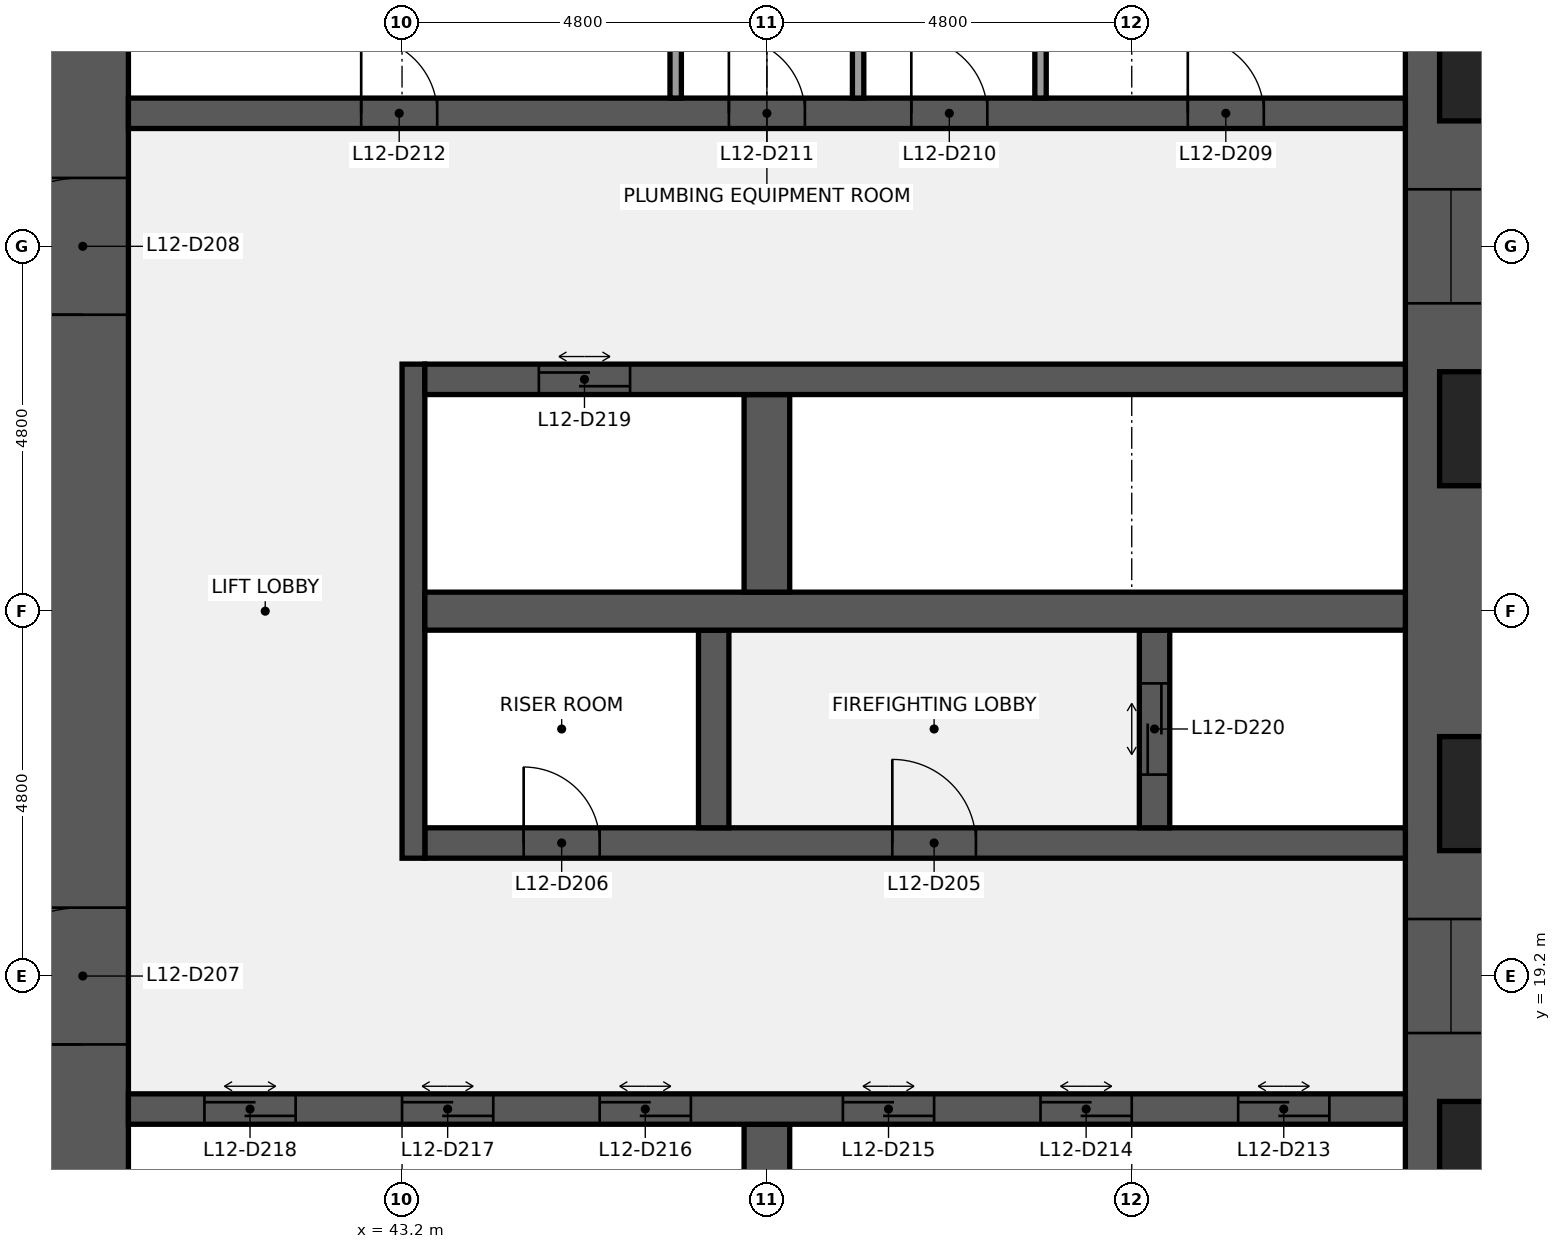
"""IFC4 building model, lengths in metres.
Left out: names, types, materials, properties, quantities, classifications, styles, units other than length and angle.
Written with IfcOpenShell. Run it as: python <this file> out.ifc"""

import sys

from ifc_helpers import new_model, si_unit, direction, frame, frame_2d, origin, place, context, subcontext, project, spatial, rectangle, extrude, element, fill, save


model = new_model("IFC4")
c1 = context("Model", 3, precision=1e-05, world=origin(), true_north=direction((0.0, 1.0)))
c2 = subcontext(c1, "Body", "Model", "MODEL_VIEW")
j1 = project(units=[si_unit("LENGTHUNIT", "METRE"), si_unit("PLANEANGLEUNIT", "RADIAN")], contexts=[c1])
p1 = place(None, origin())
s1 = spatial("IfcSite", under=j1, at=p1, CompositionType="ELEMENT")
p2 = place(p1, origin())
s2 = spatial("IfcBuilding", under=s1, at=p2, CompositionType="ELEMENT")
p3 = place(p2, frame((0.0, 0.0, 59.0)))
s3 = spatial("IfcBuildingStorey", under=s2, at=p3, CompositionType="ELEMENT", Elevation=59.0)
p4 = place(p3, frame((57.0, 38.4, 0.0), z_axis=(0.0, 0.0, 1.0), x_axis=(0.0, -1.0, 0.0)))
e1 = element("IfcWall", 1, at=p4, inside=s3, PredefinedType="SHEAR", context=c2, shape_type="SweptSolid", body=[
    extrude(rectangle(XDim=28.8, YDim=1.2, at=frame_2d((14.4, 0.0))), origin(), (0.0, 0.0, 1.0), 3.84),
])
p5 = place(p4, frame((18.45, 0.0, 0.9)))
e2 = element("IfcOpeningElement", 2, at=p5, cuts=e1, PredefinedType="OPENING", context=c2, shape_type="SweptSolid", body=[
    extrude(rectangle(XDim=1.5, YDim=1.5, at=frame_2d((0.75, 0.75))), frame((0.0, 0.61, 0.0), z_axis=(0.0, -1.0, 0.0), x_axis=(1.0, 0.0, 0.0)), (0.0, 0.0, 1.0), 1.22),
])
p6 = place(p4, frame((8.85, 0.0, 0.9)))
e3 = element("IfcOpeningElement", 3, at=p6, cuts=e1, PredefinedType="OPENING", context=c2, shape_type="SweptSolid", body=[
    extrude(rectangle(XDim=1.5, YDim=1.5, at=frame_2d((0.75, 0.75))), frame((0.0, 0.61, 0.0), z_axis=(0.0, -1.0, 0.0), x_axis=(1.0, 0.0, 0.0)), (0.0, 0.0, 1.0), 1.22),
])
p7 = place(p3, frame((39.0, 9.6, 0.0), z_axis=(0.0, 0.0, 1.0), x_axis=(0.0, 1.0, 0.0)))
e4 = element("IfcWall", 4, at=p7, inside=s3, PredefinedType="SHEAR", context=c2, shape_type="SweptSolid", body=[
    extrude(rectangle(XDim=28.8, YDim=1.2, at=frame_2d((14.4, 0.0))), origin(), (0.0, 0.0, 1.0), 3.84),
])
p8 = place(p7, frame((8.7, 0.0, 0.0)))
e5 = element("IfcOpeningElement", 5, at=p8, cuts=e4, PredefinedType="OPENING", context=c2, shape_type="SweptSolid", body=[
    extrude(rectangle(XDim=1.8, YDim=2.1, at=frame_2d((0.9, 1.05))), frame((0.0, 0.61, 0.0), z_axis=(0.0, -1.0, 0.0), x_axis=(1.0, 0.0, 0.0)), (0.0, 0.0, 1.0), 1.22),
])
p9 = place(p7, frame((18.3, 0.0, 0.0)))
e6 = element("IfcOpeningElement", 6, at=p9, cuts=e4, PredefinedType="OPENING", context=c2, shape_type="SweptSolid", body=[
    extrude(rectangle(XDim=1.8, YDim=2.1, at=frame_2d((0.9, 1.05))), frame((0.0, 0.61, 0.0), z_axis=(0.0, -1.0, 0.0), x_axis=(1.0, 0.0, 0.0)), (0.0, 0.0, 1.0), 1.22),
])
p10 = place(p3, frame((48.0, 14.65, 0.0), z_axis=(0.0, 0.0, 1.0), x_axis=(0.0, 1.0, 0.0)))
e7 = element("IfcWall", 7, at=p10, inside=s3, PredefinedType="SHEAR", context=c2, shape_type="SweptSolid", body=[
    extrude(rectangle(XDim=2.6, YDim=0.6, at=frame_2d((1.3, 0.0))), origin(), (0.0, 0.0, 1.0), 3.84),
])
p11 = place(p3, frame((39.6, 17.45, 0.0), z_axis=(0.0, 0.0, 1.0), x_axis=(1.0, 0.0, 0.0)))
e8 = element("IfcWall", 8, at=p11, inside=s3, PredefinedType="SHEAR", context=c2, shape_type="SweptSolid", body=[
    extrude(rectangle(XDim=16.8, YDim=0.4, at=frame_2d((8.4, 0.0))), origin(), (0.0, 0.0, 1.0), 3.84),
])
p12 = place(p11, frame((14.6, 0.0, 0.0)))
e9 = element("IfcOpeningElement", 9, at=p12, cuts=e8, PredefinedType="OPENING", context=c2, shape_type="SweptSolid", body=[
    extrude(rectangle(XDim=1.2, YDim=2.1, at=frame_2d((0.6, 1.05))), frame((0.0, 0.21, 0.0), z_axis=(0.0, -1.0, 0.0), x_axis=(1.0, 0.0, 0.0)), (0.0, 0.0, 1.0), 0.42),
])
p13 = place(p11, frame((12.0, 0.0, 0.0)))
e10 = element("IfcOpeningElement", 10, at=p13, cuts=e8, PredefinedType="OPENING", context=c2, shape_type="SweptSolid", body=[
    extrude(rectangle(XDim=1.2, YDim=2.1, at=frame_2d((0.6, 1.05))), frame((0.0, 0.21, 0.0), z_axis=(0.0, -1.0, 0.0), x_axis=(1.0, 0.0, 0.0)), (0.0, 0.0, 1.0), 0.42),
])
p14 = place(p11, frame((9.4, 0.0, 0.0)))
e11 = element("IfcOpeningElement", 11, at=p14, cuts=e8, PredefinedType="OPENING", context=c2, shape_type="SweptSolid", body=[
    extrude(rectangle(XDim=1.2, YDim=2.1, at=frame_2d((0.6, 1.05))), frame((0.0, 0.21, 0.0), z_axis=(0.0, -1.0, 0.0), x_axis=(1.0, 0.0, 0.0)), (0.0, 0.0, 1.0), 0.42),
])
p15 = place(p11, frame((6.2, 0.0, 0.0)))
e12 = element("IfcOpeningElement", 12, at=p15, cuts=e8, PredefinedType="OPENING", context=c2, shape_type="SweptSolid", body=[
    extrude(rectangle(XDim=1.2, YDim=2.1, at=frame_2d((0.6, 1.05))), frame((0.0, 0.21, 0.0), z_axis=(0.0, -1.0, 0.0), x_axis=(1.0, 0.0, 0.0)), (0.0, 0.0, 1.0), 0.42),
])
p16 = place(p11, frame((3.6, 0.0, 0.0)))
e13 = element("IfcOpeningElement", 13, at=p16, cuts=e8, PredefinedType="OPENING", context=c2, shape_type="SweptSolid", body=[
    extrude(rectangle(XDim=1.2, YDim=2.1, at=frame_2d((0.6, 1.05))), frame((0.0, 0.21, 0.0), z_axis=(0.0, -1.0, 0.0), x_axis=(1.0, 0.0, 0.0)), (0.0, 0.0, 1.0), 0.42),
])
p17 = place(p11, frame((1.0, 0.0, 0.0)))
e14 = element("IfcOpeningElement", 14, at=p17, cuts=e8, PredefinedType="OPENING", context=c2, shape_type="SweptSolid", body=[
    extrude(rectangle(XDim=1.2, YDim=2.1, at=frame_2d((0.6, 1.05))), frame((0.0, 0.21, 0.0), z_axis=(0.0, -1.0, 0.0), x_axis=(1.0, 0.0, 0.0)), (0.0, 0.0, 1.0), 0.42),
])
p18 = place(p3, frame((43.5, 20.95, 0.0), z_axis=(0.0, 0.0, 1.0), x_axis=(1.0, 0.0, 0.0)))
e15 = element("IfcWall", 15, at=p18, inside=s3, PredefinedType="SHEAR", context=c2, shape_type="SweptSolid", body=[
    extrude(rectangle(XDim=12.9, YDim=0.4, at=frame_2d((6.45, 0.0))), origin(), (0.0, 0.0, 1.0), 3.84),
])
p19 = place(p18, frame((6.15, 0.0, 0.0)))
e16 = element("IfcOpeningElement", 16, at=p19, cuts=e15, PredefinedType="OPENING", context=c2, shape_type="SweptSolid", body=[
    extrude(rectangle(XDim=1.1, YDim=2.1, at=frame_2d((0.55, 1.05))), frame((0.0, 0.21, 0.0), z_axis=(0.0, -1.0, 0.0), x_axis=(1.0, 0.0, 0.0)), (0.0, 0.0, 1.0), 0.42),
])
p20 = place(p18, frame((1.3, 0.0, 0.0)))
e17 = element("IfcOpeningElement", 17, at=p20, cuts=e15, PredefinedType="OPENING", context=c2, shape_type="SweptSolid", body=[
    extrude(rectangle(XDim=1.0, YDim=2.1, at=frame_2d((0.5, 1.05))), frame((0.0, 0.21, 0.0), z_axis=(0.0, -1.0, 0.0), x_axis=(1.0, 0.0, 0.0)), (0.0, 0.0, 1.0), 0.42),
])
p21 = place(p3, frame((43.35, 20.75, 0.0), z_axis=(0.0, 0.0, 1.0), x_axis=(0.0, 1.0, 0.0)))
e18 = element("IfcWall", 18, at=p21, inside=s3, PredefinedType="SHEAR", context=c2, shape_type="SweptSolid", body=[
    extrude(rectangle(XDim=6.5, YDim=0.3, at=frame_2d((3.25, 0.0))), origin(), (0.0, 0.0, 1.0), 3.84),
])
p22 = place(p3, frame((53.1, 21.15, 0.0), z_axis=(0.0, 0.0, 1.0), x_axis=(0.0, 1.0, 0.0)))
e19 = element("IfcWall", 19, at=p22, inside=s3, PredefinedType="SHEAR", context=c2, shape_type="SweptSolid", body=[
    extrude(rectangle(XDim=2.6, YDim=0.4, at=frame_2d((1.3, 0.0))), origin(), (0.0, 0.0, 1.0), 3.84),
])
p23 = place(p22, frame((0.7, 0.0, 0.0)))
e20 = element("IfcOpeningElement", 20, at=p23, cuts=e19, PredefinedType="OPENING", context=c2, shape_type="SweptSolid", body=[
    extrude(rectangle(XDim=1.2, YDim=2.1, at=frame_2d((0.6, 1.05))), frame((0.0, 0.21, 0.0), z_axis=(0.0, -1.0, 0.0), x_axis=(1.0, 0.0, 0.0)), (0.0, 0.0, 1.0), 0.42),
])
p24 = place(p3, frame((47.3, 21.15, 0.0), z_axis=(0.0, 0.0, 1.0), x_axis=(0.0, 1.0, 0.0)))
e21 = element("IfcWall", 21, at=p24, inside=s3, PredefinedType="SHEAR", context=c2, shape_type="SweptSolid", body=[
    extrude(rectangle(XDim=2.6, YDim=0.4, at=frame_2d((1.3, 0.0))), origin(), (0.0, 0.0, 1.0), 3.84),
])
p25 = place(p3, frame((43.5, 24.0, 0.0), z_axis=(0.0, 0.0, 1.0), x_axis=(1.0, 0.0, 0.0)))
e22 = element("IfcWall", 22, at=p25, inside=s3, PredefinedType="SHEAR", context=c2, shape_type="SweptSolid", body=[
    extrude(rectangle(XDim=12.9, YDim=0.5, at=frame_2d((6.45, 0.0))), origin(), (0.0, 0.0, 1.0), 3.84),
])
p26 = place(p3, frame((48.0, 24.25, 0.0), z_axis=(0.0, 0.0, 1.0), x_axis=(0.0, 1.0, 0.0)))
e23 = element("IfcWall", 23, at=p26, inside=s3, PredefinedType="SHEAR", context=c2, shape_type="SweptSolid", body=[
    extrude(rectangle(XDim=2.6, YDim=0.6, at=frame_2d((1.3, 0.0))), origin(), (0.0, 0.0, 1.0), 3.84),
])
p27 = place(p3, frame((43.5, 27.05, 0.0), z_axis=(0.0, 0.0, 1.0), x_axis=(1.0, 0.0, 0.0)))
e24 = element("IfcWall", 24, at=p27, inside=s3, PredefinedType="SHEAR", context=c2, shape_type="SweptSolid", body=[
    extrude(rectangle(XDim=12.9, YDim=0.4, at=frame_2d((6.45, 0.0))), origin(), (0.0, 0.0, 1.0), 3.84),
])
p28 = place(p27, frame((1.5, 0.0, 0.0)))
e25 = element("IfcOpeningElement", 25, at=p28, cuts=e24, PredefinedType="OPENING", context=c2, shape_type="SweptSolid", body=[
    extrude(rectangle(XDim=1.2, YDim=2.1, at=frame_2d((0.6, 1.05))), frame((0.0, 0.21, 0.0), z_axis=(0.0, -1.0, 0.0), x_axis=(1.0, 0.0, 0.0)), (0.0, 0.0, 1.0), 0.42),
])
p29 = place(p3, frame((39.6, 30.55, 0.0), z_axis=(0.0, 0.0, 1.0), x_axis=(1.0, 0.0, 0.0)))
e26 = element("IfcWall", 26, at=p29, inside=s3, PredefinedType="SHEAR", context=c2, shape_type="SweptSolid", body=[
    extrude(rectangle(XDim=16.8, YDim=0.4, at=frame_2d((8.4, 0.0))), origin(), (0.0, 0.0, 1.0), 3.84),
])
p30 = place(p29, frame((13.938, 0.0, 0.0)))
e27 = element("IfcOpeningElement", 27, at=p30, cuts=e26, PredefinedType="OPENING", context=c2, shape_type="SweptSolid", body=[
    extrude(rectangle(XDim=1.0, YDim=2.1, at=frame_2d((0.5, 1.05))), frame((0.0, 0.21, 0.0), z_axis=(0.0, -1.0, 0.0), x_axis=(1.0, 0.0, 0.0)), (0.0, 0.0, 1.0), 0.42),
])
p31 = place(p29, frame((10.3, 0.0, 0.0)))
e28 = element("IfcOpeningElement", 28, at=p31, cuts=e26, PredefinedType="OPENING", context=c2, shape_type="SweptSolid", body=[
    extrude(rectangle(XDim=1.0, YDim=2.1, at=frame_2d((0.5, 1.05))), frame((0.0, 0.21, 0.0), z_axis=(0.0, -1.0, 0.0), x_axis=(1.0, 0.0, 0.0)), (0.0, 0.0, 1.0), 0.42),
])
p32 = place(p29, frame((7.9, 0.0, 0.0)))
e29 = element("IfcOpeningElement", 29, at=p32, cuts=e26, PredefinedType="OPENING", context=c2, shape_type="SweptSolid", body=[
    extrude(rectangle(XDim=1.0, YDim=2.1, at=frame_2d((0.5, 1.05))), frame((0.0, 0.21, 0.0), z_axis=(0.0, -1.0, 0.0), x_axis=(1.0, 0.0, 0.0)), (0.0, 0.0, 1.0), 0.42),
])
p33 = place(p29, frame((3.062, 0.0, 0.0)))
e30 = element("IfcOpeningElement", 30, at=p33, cuts=e26, PredefinedType="OPENING", context=c2, shape_type="SweptSolid", body=[
    extrude(rectangle(XDim=1.0, YDim=2.1, at=frame_2d((0.5, 1.05))), frame((0.0, 0.21, 0.0), z_axis=(0.0, -1.0, 0.0), x_axis=(1.0, 0.0, 0.0)), (0.0, 0.0, 1.0), 0.42),
])
for number, where, z_axis, x_axis in (
    (31, (51.6, 30.75, 0.0), (0.0, 0.0, 1.0), (0.0, 1.0, 0.0)),
    (32, (49.2, 30.75, 0.0), (0.0, 0.0, 1.0), (0.0, 1.0, 0.0)),
    (33, (46.8, 30.75, 0.0), (0.0, 0.0, 1.0), (0.0, 1.0, 0.0)),
):
    element("IfcWall", number, at=place(p3, frame(where, z_axis=z_axis, x_axis=x_axis)), inside=s3, PredefinedType="PARTITIONING", context=c2, shape_type="SweptSolid", body=[
        extrude(rectangle(XDim=2.6, YDim=0.15, at=frame_2d((1.3, 0.0))), origin(), (0.0, 0.0, 1.0), 3.84),
    ])
p34 = place(p19, origin())
e34 = element("IfcDoor", 34, at=p34, inside=s3, OperationType="SINGLE_SWING_LEFT", PredefinedType="DOOR", context=c2, shape_type="SweptSolid", body=[
    extrude(rectangle(XDim=1.1, YDim=2.1, at=frame_2d((0.55, 1.05))), frame((0.0, 0.025, 0.0), z_axis=(0.0, -1.0, 0.0), x_axis=(1.0, 0.0, 0.0)), (0.0, 0.0, 1.0), 0.05),
])
fill(e16, e34)
p35 = place(p20, origin())
e35 = element("IfcDoor", 35, at=p35, inside=s3, OperationType="SINGLE_SWING_LEFT", PredefinedType="DOOR", context=c2, shape_type="SweptSolid", body=[
    extrude(rectangle(XDim=1.0, YDim=2.1, at=frame_2d((0.5, 1.05))), frame((0.0, 0.025, 0.0), z_axis=(0.0, -1.0, 0.0), x_axis=(1.0, 0.0, 0.0)), (0.0, 0.0, 1.0), 0.05),
])
fill(e17, e35)
p36 = place(p8, origin())
e36 = element("IfcDoor", 36, at=p36, inside=s3, OperationType="DOUBLE_DOOR_SINGLE_SWING", PredefinedType="DOOR", context=c2, shape_type="SweptSolid", body=[
    extrude(rectangle(XDim=1.8, YDim=2.1, at=frame_2d((0.9, 1.05))), frame((0.0, 0.025, 0.0), z_axis=(0.0, -1.0, 0.0), x_axis=(1.0, 0.0, 0.0)), (0.0, 0.0, 1.0), 0.05),
])
fill(e5, e36)
p37 = place(p9, origin())
e37 = element("IfcDoor", 37, at=p37, inside=s3, OperationType="DOUBLE_DOOR_SINGLE_SWING", PredefinedType="DOOR", context=c2, shape_type="SweptSolid", body=[
    extrude(rectangle(XDim=1.8, YDim=2.1, at=frame_2d((0.9, 1.05))), frame((0.0, 0.025, 0.0), z_axis=(0.0, -1.0, 0.0), x_axis=(1.0, 0.0, 0.0)), (0.0, 0.0, 1.0), 0.05),
])
fill(e6, e37)
p38 = place(p30, origin())
e38 = element("IfcDoor", 38, at=p38, inside=s3, OperationType="SINGLE_SWING_LEFT", PredefinedType="DOOR", context=c2, shape_type="SweptSolid", body=[
    extrude(rectangle(XDim=1.0, YDim=2.1, at=frame_2d((0.5, 1.05))), frame((0.0, 0.025, 0.0), z_axis=(0.0, -1.0, 0.0), x_axis=(1.0, 0.0, 0.0)), (0.0, 0.0, 1.0), 0.05),
])
fill(e27, e38)
p39 = place(p31, origin())
e39 = element("IfcDoor", 39, at=p39, inside=s3, OperationType="SINGLE_SWING_LEFT", PredefinedType="DOOR", context=c2, shape_type="SweptSolid", body=[
    extrude(rectangle(XDim=1.0, YDim=2.1, at=frame_2d((0.5, 1.05))), frame((0.0, 0.025, 0.0), z_axis=(0.0, -1.0, 0.0), x_axis=(1.0, 0.0, 0.0)), (0.0, 0.0, 1.0), 0.05),
])
fill(e28, e39)
p40 = place(p32, origin())
e40 = element("IfcDoor", 40, at=p40, inside=s3, OperationType="SINGLE_SWING_LEFT", PredefinedType="DOOR", context=c2, shape_type="SweptSolid", body=[
    extrude(rectangle(XDim=1.0, YDim=2.1, at=frame_2d((0.5, 1.05))), frame((0.0, 0.025, 0.0), z_axis=(0.0, -1.0, 0.0), x_axis=(1.0, 0.0, 0.0)), (0.0, 0.0, 1.0), 0.05),
])
fill(e29, e40)
p41 = place(p33, origin())
e41 = element("IfcDoor", 41, at=p41, inside=s3, OperationType="SINGLE_SWING_LEFT", PredefinedType="DOOR", context=c2, shape_type="SweptSolid", body=[
    extrude(rectangle(XDim=1.0, YDim=2.1, at=frame_2d((0.5, 1.05))), frame((0.0, 0.025, 0.0), z_axis=(0.0, -1.0, 0.0), x_axis=(1.0, 0.0, 0.0)), (0.0, 0.0, 1.0), 0.05),
])
fill(e30, e41)
p42 = place(p12, origin())
e42 = element("IfcDoor", 42, at=p42, inside=s3, OperationType="DOUBLE_DOOR_SLIDING", PredefinedType="DOOR", context=c2, shape_type="SweptSolid", body=[
    extrude(rectangle(XDim=1.2, YDim=2.1, at=frame_2d((0.6, 1.05))), frame((0.0, 0.025, 0.0), z_axis=(0.0, -1.0, 0.0), x_axis=(1.0, 0.0, 0.0)), (0.0, 0.0, 1.0), 0.05),
])
fill(e9, e42)
p43 = place(p13, origin())
e43 = element("IfcDoor", 43, at=p43, inside=s3, OperationType="DOUBLE_DOOR_SLIDING", PredefinedType="DOOR", context=c2, shape_type="SweptSolid", body=[
    extrude(rectangle(XDim=1.2, YDim=2.1, at=frame_2d((0.6, 1.05))), frame((0.0, 0.025, 0.0), z_axis=(0.0, -1.0, 0.0), x_axis=(1.0, 0.0, 0.0)), (0.0, 0.0, 1.0), 0.05),
])
fill(e10, e43)
p44 = place(p14, origin())
e44 = element("IfcDoor", 44, at=p44, inside=s3, OperationType="DOUBLE_DOOR_SLIDING", PredefinedType="DOOR", context=c2, shape_type="SweptSolid", body=[
    extrude(rectangle(XDim=1.2, YDim=2.1, at=frame_2d((0.6, 1.05))), frame((0.0, 0.025, 0.0), z_axis=(0.0, -1.0, 0.0), x_axis=(1.0, 0.0, 0.0)), (0.0, 0.0, 1.0), 0.05),
])
fill(e11, e44)
p45 = place(p15, origin())
e45 = element("IfcDoor", 45, at=p45, inside=s3, OperationType="DOUBLE_DOOR_SLIDING", PredefinedType="DOOR", context=c2, shape_type="SweptSolid", body=[
    extrude(rectangle(XDim=1.2, YDim=2.1, at=frame_2d((0.6, 1.05))), frame((0.0, 0.025, 0.0), z_axis=(0.0, -1.0, 0.0), x_axis=(1.0, 0.0, 0.0)), (0.0, 0.0, 1.0), 0.05),
])
fill(e12, e45)
p46 = place(p16, origin())
e46 = element("IfcDoor", 46, at=p46, inside=s3, OperationType="DOUBLE_DOOR_SLIDING", PredefinedType="DOOR", context=c2, shape_type="SweptSolid", body=[
    extrude(rectangle(XDim=1.2, YDim=2.1, at=frame_2d((0.6, 1.05))), frame((0.0, 0.025, 0.0), z_axis=(0.0, -1.0, 0.0), x_axis=(1.0, 0.0, 0.0)), (0.0, 0.0, 1.0), 0.05),
])
fill(e13, e46)
p47 = place(p17, origin())
e47 = element("IfcDoor", 47, at=p47, inside=s3, OperationType="DOUBLE_DOOR_SLIDING", PredefinedType="DOOR", context=c2, shape_type="SweptSolid", body=[
    extrude(rectangle(XDim=1.2, YDim=2.1, at=frame_2d((0.6, 1.05))), frame((0.0, 0.025, 0.0), z_axis=(0.0, -1.0, 0.0), x_axis=(1.0, 0.0, 0.0)), (0.0, 0.0, 1.0), 0.05),
])
fill(e14, e47)
p48 = place(p28, origin())
e48 = element("IfcDoor", 48, at=p48, inside=s3, OperationType="DOUBLE_DOOR_SLIDING", PredefinedType="DOOR", context=c2, shape_type="SweptSolid", body=[
    extrude(rectangle(XDim=1.2, YDim=2.1, at=frame_2d((0.6, 1.05))), frame((0.0, 0.025, 0.0), z_axis=(0.0, -1.0, 0.0), x_axis=(1.0, 0.0, 0.0)), (0.0, 0.0, 1.0), 0.05),
])
fill(e25, e48)
p49 = place(p23, origin())
e49 = element("IfcDoor", 49, at=p49, inside=s3, OperationType="DOUBLE_DOOR_SLIDING", PredefinedType="DOOR", context=c2, shape_type="SweptSolid", body=[
    extrude(rectangle(XDim=1.2, YDim=2.1, at=frame_2d((0.6, 1.05))), frame((0.0, 0.025, 0.0), z_axis=(0.0, -1.0, 0.0), x_axis=(1.0, 0.0, 0.0)), (0.0, 0.0, 1.0), 0.05),
])
fill(e20, e49)
p50 = place(p5, origin())
e50 = element("IfcWindow", 50, at=p50, inside=s3, PartitioningType="SINGLE_PANEL", PredefinedType="WINDOW", context=c2, shape_type="SweptSolid", body=[
    extrude(rectangle(XDim=1.5, YDim=1.5, at=frame_2d((0.75, 0.75))), frame((0.0, 0.03, 0.0), z_axis=(0.0, -1.0, 0.0), x_axis=(1.0, 0.0, 0.0)), (0.0, 0.0, 1.0), 0.06),
])
fill(e2, e50)
p51 = place(p6, origin())
e51 = element("IfcWindow", 51, at=p51, inside=s3, PartitioningType="SINGLE_PANEL", PredefinedType="WINDOW", context=c2, shape_type="SweptSolid", body=[
    extrude(rectangle(XDim=1.5, YDim=1.5, at=frame_2d((0.75, 0.75))), frame((0.0, 0.03, 0.0), z_axis=(0.0, -1.0, 0.0), x_axis=(1.0, 0.0, 0.0)), (0.0, 0.0, 1.0), 0.06),
])
fill(e3, e51)
save(model, sys.argv[1])
